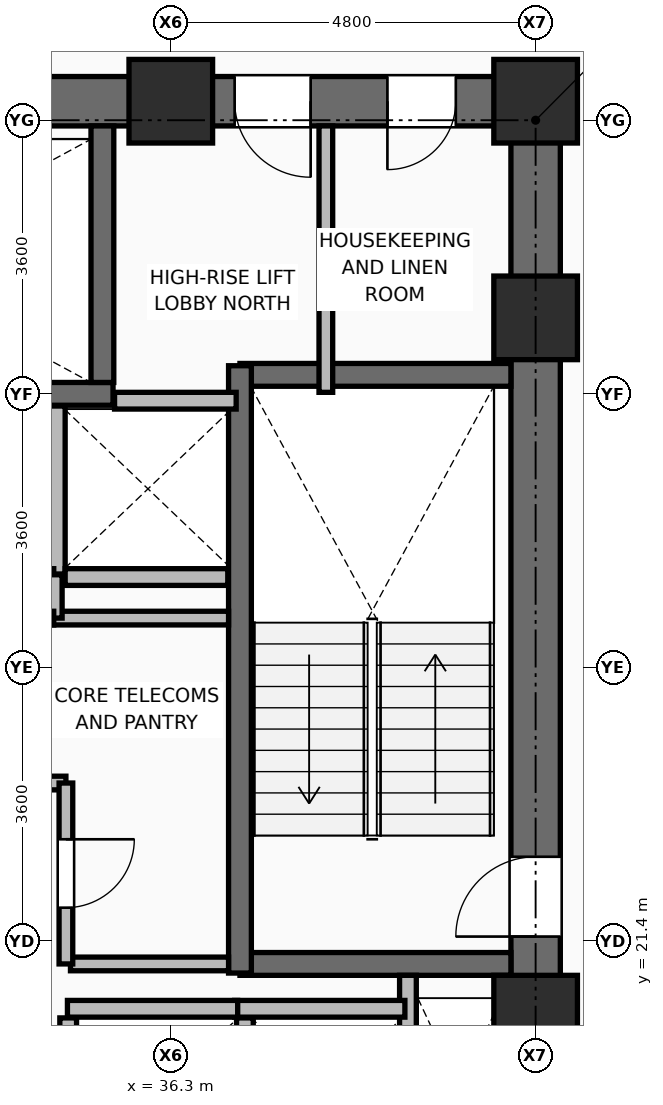
"""IFC4 building model, lengths in metres.
Left out: names, types, materials, properties, quantities, classifications, styles, units other than length and angle.
Written with IfcOpenShell. Run it as: python <this file> out.ifc"""

import sys

from ifc_helpers import new_model, si_unit, direction, frame, frame_2d, origin, origin_2d, place, context, subcontext, project, spatial, rectangle, extrude, element, fill, save


model = new_model("IFC4")
c1 = context("Model", 3, precision=1e-05, world=origin(), true_north=direction((0.0, 1.0)))
c2 = subcontext(c1, "Body", "Model", "MODEL_VIEW")
j1 = project(units=[si_unit("LENGTHUNIT", "METRE"), si_unit("PLANEANGLEUNIT", "RADIAN")], contexts=[c1])
p1 = place(None, origin())
s1 = spatial("IfcSite", under=j1, at=p1, CompositionType="ELEMENT")
p2 = place(p1, origin())
s2 = spatial("IfcBuilding", under=s1, at=p2, CompositionType="ELEMENT")
p3 = place(p2, frame((0.0, 0.0, 79.5)))
s3 = spatial("IfcBuildingStorey", under=s2, at=p3, CompositionType="ELEMENT", Elevation=79.5)
for number, where, z_axis, x_axis in (
    (1, (41.1, 20.4, 0.0), (0.0, 0.0, 1.0), (1.0, 0.0, 0.0)),
    (2, (41.1, 29.6, 0.0), (0.0, 0.0, 1.0), (1.0, 0.0, 0.0)),
    (3, (36.3, 32.45, 0.0), (0.0, 0.0, 1.0), (1.0, 0.0, 0.0)),
    (4, (41.1, 32.45, 0.0), (0.0, 0.0, 1.0), (1.0, 0.0, 0.0)),
):
    element("IfcColumn", number, at=place(p3, frame(where, z_axis=z_axis, x_axis=x_axis)), inside=s3, PredefinedType="COLUMN", context=c2, shape_type="SweptSolid", body=[
        extrude(rectangle(XDim=1.1, YDim=1.1, at=origin_2d()), origin(), (0.0, 0.0, 1.0), 3.75),
    ])
p4 = place(p3, frame((34.95, 17.92, 0.0), z_axis=(0.0, 0.0, 1.0), x_axis=(0.0, 1.0, 0.0)))
e5 = element("IfcWall", 5, at=p4, inside=s3, PredefinedType="PARTITIONING", context=c2, shape_type="SweptSolid", body=[
    extrude(rectangle(XDim=2.47, YDim=0.22, at=frame_2d((1.235, 0.0))), origin(), (0.0, 0.0, 1.0), 2.928),
])
p5 = place(p3, frame((37.275, 18.08, 0.0), z_axis=(0.0, 0.0, 1.0), x_axis=(0.0, 1.0, 0.0)))
e6 = element("IfcWall", 6, at=p5, inside=s3, PredefinedType="PARTITIONING", context=c2, shape_type="SweptSolid", body=[
    extrude(rectangle(XDim=2.31, YDim=0.22, at=frame_2d((1.155, 0.0))), origin(), (0.0, 0.0, 1.0), 3.545),
])
p6 = place(p3, frame((34.8, 26.23, 0.0), z_axis=(0.0, 0.0, 1.0), x_axis=(0.0, 1.0, 0.0)))
e7 = element("IfcWall", 7, at=p6, inside=s3, PredefinedType="PARTITIONING", context=c2, shape_type="SweptSolid", body=[
    extrude(rectangle(XDim=2.21, YDim=0.22, at=frame_2d((1.105, 0.0))), origin(), (0.0, 0.0, 1.0), 3.545),
])
p7 = place(p3, frame((34.91, 26.19, 0.0), z_axis=(0.0, 0.0, 1.0), x_axis=(1.0, 0.0, 0.0)))
e8 = element("IfcWall", 8, at=p7, inside=s3, PredefinedType="PARTITIONING", context=c2, shape_type="SweptSolid", body=[
    extrude(rectangle(XDim=2.14, YDim=0.22, at=frame_2d((1.07, 0.0))), origin(), (0.0, 0.0, 1.0), 3.545),
])
p8 = place(p3, frame((21.575, 32.45, 0.0), z_axis=(0.0, 0.0, 1.0), x_axis=(1.0, 0.0, 0.0)))
e9 = element("IfcWall", 9, at=p8, inside=s3, PredefinedType="SHEAR", context=c2, shape_type="SweptSolid", body=[
    extrude(rectangle(XDim=19.85, YDim=0.65, at=frame_2d((9.925, 0.0))), origin(), (0.0, 0.0, 1.0), 3.57),
])
p9 = place(p8, frame((2.175, 0.0, 0.0)))
e10 = element("IfcOpeningElement", 10, at=p9, cuts=e9, PredefinedType="OPENING", context=c2, shape_type="SweptSolid", body=[
    extrude(rectangle(XDim=1.1, YDim=2.1, at=frame_2d((0.55, 1.05))), frame((0.0, 0.335, 0.0), z_axis=(0.0, -1.0, 0.0), x_axis=(1.0, 0.0, 0.0)), (0.0, 0.0, 1.0), 0.67),
])
p10 = place(p8, frame((15.565, 0.0, 0.0)))
e11 = element("IfcOpeningElement", 11, at=p10, cuts=e9, PredefinedType="OPENING", context=c2, shape_type="SweptSolid", body=[
    extrude(rectangle(XDim=1.0, YDim=2.1, at=frame_2d((0.5, 1.05))), frame((0.0, 0.335, 0.0), z_axis=(0.0, -1.0, 0.0), x_axis=(1.0, 0.0, 0.0)), (0.0, 0.0, 1.0), 0.67),
])
p11 = place(p8, frame((17.575, 0.0, 0.0)))
e12 = element("IfcOpeningElement", 12, at=p11, cuts=e9, PredefinedType="OPENING", context=c2, shape_type="SweptSolid", body=[
    extrude(rectangle(XDim=0.9, YDim=2.1, at=frame_2d((0.45, 1.05))), frame((0.0, 0.335, 0.0), z_axis=(0.0, -1.0, 0.0), x_axis=(1.0, 0.0, 0.0)), (0.0, 0.0, 1.0), 0.67),
])
p12 = place(p3, frame((41.1, 18.125, 0.0), z_axis=(0.0, 0.0, 1.0), x_axis=(0.0, 1.0, 0.0)))
e13 = element("IfcWall", 13, at=p12, inside=s3, PredefinedType="SHEAR", context=c2, shape_type="SweptSolid", body=[
    extrude(rectangle(XDim=14.0, YDim=0.65, at=frame_2d((7.0, 0.0))), origin(), (0.0, 0.0, 1.0), 3.57),
])
p13 = place(p12, frame((3.335, 0.0, 0.0)))
e14 = element("IfcOpeningElement", 14, at=p13, cuts=e13, PredefinedType="OPENING", context=c2, shape_type="SweptSolid", body=[
    extrude(rectangle(XDim=1.05, YDim=2.1, at=frame_2d((0.525, 1.05))), frame((0.0, 0.335, 0.0), z_axis=(0.0, -1.0, 0.0), x_axis=(1.0, 0.0, 0.0)), (0.0, 0.0, 1.0), 0.67),
])
for number, where, z_axis, x_axis in (
    (15, (37.21, 21.1, 0.0), (0.0, 0.0, 1.0), (1.0, 0.0, 0.0)),
    (16, (37.21, 28.85, 0.0), (0.0, 0.0, 1.0), (1.0, 0.0, 0.0)),
):
    element("IfcWall", number, at=place(p3, frame(where, z_axis=z_axis, x_axis=x_axis)), inside=s3, PredefinedType="SHEAR", context=c2, shape_type="SweptSolid", body=[
        extrude(rectangle(XDim=3.565, YDim=0.3, at=frame_2d((1.782, 0.0))), origin(), (0.0, 0.0, 1.0), 3.57),
    ])
p14 = place(p3, frame((37.21, 20.98, 0.0), z_axis=(0.0, 0.0, 1.0), x_axis=(0.0, 1.0, 0.0)))
e17 = element("IfcWall", 17, at=p14, inside=s3, PredefinedType="SHEAR", context=c2, shape_type="SweptSolid", body=[
    extrude(rectangle(XDim=7.99, YDim=0.3, at=frame_2d((3.995, 0.0))), origin(), (0.0, 0.0, 1.0), 3.57),
])
p15 = place(p3, frame((27.51, 28.6, 0.0), z_axis=(0.0, 0.0, 1.0), x_axis=(1.0, 0.0, 0.0)))
e18 = element("IfcWall", 18, at=p15, inside=s3, PredefinedType="SHEAR", context=c2, shape_type="SweptSolid", body=[
    extrude(rectangle(XDim=8.03, YDim=0.3, at=frame_2d((4.015, 0.0))), origin(), (0.0, 0.0, 1.0), 3.57),
])
p16 = place(p3, frame((35.4, 28.75, 0.0), z_axis=(0.0, 0.0, 1.0), x_axis=(0.0, 1.0, 0.0)))
e19 = element("IfcWall", 19, at=p16, inside=s3, PredefinedType="SHEAR", context=c2, shape_type="SweptSolid", body=[
    extrude(rectangle(XDim=3.375, YDim=0.3, at=frame_2d((1.688, 0.0))), origin(), (0.0, 0.0, 1.0), 3.57),
])
p17 = place(p3, frame((39.42, 18.125, 0.0), z_axis=(0.0, 0.0, 1.0), x_axis=(0.0, 1.0, 0.0)))
e20 = element("IfcWall", 20, at=p17, inside=s3, PredefinedType="PARTITIONING", context=c2, shape_type="SweptSolid", body=[
    extrude(rectangle(XDim=2.825, YDim=0.22, at=frame_2d((1.413, 0.0))), origin(), (0.0, 0.0, 1.0), 3.55),
])
for number, where, z_axis, x_axis in (
    (21, (37.14, 20.51, 0.0), (0.0, 0.0, 1.0), (1.0, 0.0, 0.0)),
    (22, (34.94, 20.51, 0.0), (0.0, 0.0, 1.0), (1.0, 0.0, 0.0)),
):
    element("IfcWall", number, at=place(p3, frame(where, z_axis=z_axis, x_axis=x_axis)), inside=s3, PredefinedType="PARTITIONING", context=c2, shape_type="SweptSolid", body=[
        extrude(rectangle(XDim=2.24, YDim=0.22, at=frame_2d((1.12, 0.0))), origin(), (0.0, 0.0, 1.0), 3.55),
    ])
p18 = place(p3, frame((32.44, 26.19, 0.0), z_axis=(0.0, 0.0, 1.0), x_axis=(1.0, 0.0, 0.0)))
e23 = element("IfcWall", 23, at=p18, inside=s3, PredefinedType="PARTITIONING", context=c2, shape_type="SweptSolid", body=[
    extrude(rectangle(XDim=2.32, YDim=0.22, at=frame_2d((1.16, 0.0))), origin(), (0.0, 0.0, 1.0), 3.55),
])
p19 = place(p3, frame((35.56, 28.51, 0.0), z_axis=(0.0, 0.0, 1.0), x_axis=(1.0, 0.0, 0.0)))
e24 = element("IfcWall", 24, at=p19, inside=s3, PredefinedType="PARTITIONING", context=c2, shape_type="SweptSolid", body=[
    extrude(rectangle(XDim=1.6, YDim=0.22, at=frame_2d((0.8, 0.0))), origin(), (0.0, 0.0, 1.0), 3.55),
])
p20 = place(p3, frame((34.98, 21.1, 0.0), z_axis=(0.0, 0.0, 1.0), x_axis=(1.0, 0.0, 0.0)))
e25 = element("IfcWall", 25, at=p20, inside=s3, PredefinedType="PARTITIONING", context=c2, shape_type="SweptSolid", body=[
    extrude(rectangle(XDim=2.08, YDim=0.18, at=frame_2d((1.04, 0.0))), origin(), (0.0, 0.0, 1.0), 3.55),
])
p21 = place(p3, frame((34.72, 25.65, 0.0), z_axis=(0.0, 0.0, 1.0), x_axis=(1.0, 0.0, 0.0)))
e26 = element("IfcWall", 26, at=p21, inside=s3, PredefinedType="PARTITIONING", context=c2, shape_type="SweptSolid", body=[
    extrude(rectangle(XDim=2.34, YDim=0.18, at=frame_2d((1.17, 0.0))), origin(), (0.0, 0.0, 1.0), 3.55),
])
p22 = place(p3, frame((34.76, 25.65, 0.0), z_axis=(0.0, 0.0, 1.0), x_axis=(0.0, 1.0, 0.0)))
e27 = element("IfcWall", 27, at=p22, inside=s3, PredefinedType="PARTITIONING", context=c2, shape_type="SweptSolid", body=[
    extrude(rectangle(XDim=0.57, YDim=0.22, at=frame_2d((0.285, 0.0))), origin(), (0.0, 0.0, 1.0), 3.55),
])
p23 = place(p3, frame((33.08, 25.65, 0.0), z_axis=(0.0, 0.0, 1.0), x_axis=(1.0, 0.0, 0.0)))
e28 = element("IfcWall", 28, at=p23, inside=s3, PredefinedType="PARTITIONING", context=c2, shape_type="SweptSolid", body=[
    extrude(rectangle(XDim=1.68, YDim=0.18, at=frame_2d((0.84, 0.0))), origin(), (0.0, 0.0, 1.0), 3.55),
])
p24 = place(p3, frame((33.08, 23.48, 0.0), z_axis=(0.0, 0.0, 1.0), x_axis=(1.0, 0.0, 0.0)))
e29 = element("IfcWall", 29, at=p24, inside=s3, PredefinedType="PARTITIONING", context=c2, shape_type="SweptSolid", body=[
    extrude(rectangle(XDim=1.84, YDim=0.18, at=frame_2d((0.92, 0.0))), origin(), (0.0, 0.0, 1.0), 3.55),
])
p25 = place(p3, frame((34.92, 21.1, 0.0), z_axis=(0.0, 0.0, 1.0), x_axis=(0.0, 1.0, 0.0)))
e30 = element("IfcWall", 30, at=p25, inside=s3, PredefinedType="PARTITIONING", context=c2, shape_type="SweptSolid", body=[
    extrude(rectangle(XDim=2.38, YDim=0.18, at=frame_2d((1.19, 0.0))), origin(), (0.0, 0.0, 1.0), 3.55),
])
p26 = place(p25, frame((0.74, 0.0, 0.0)))
e31 = element("IfcOpeningElement", 31, at=p26, cuts=e30, PredefinedType="OPENING", context=c2, shape_type="SweptSolid", body=[
    extrude(rectangle(XDim=0.9, YDim=2.1, at=frame_2d((0.45, 1.05))), frame((0.0, 0.1, 0.0), z_axis=(0.0, -1.0, 0.0), x_axis=(1.0, 0.0, 0.0)), (0.0, 0.0, 1.0), 0.2),
])
p27 = place(p3, frame((38.34, 28.62, 0.0), z_axis=(0.0, 0.0, 1.0), x_axis=(0.0, 1.0, 0.0)))
e32 = element("IfcWall", 32, at=p27, inside=s3, PredefinedType="PARTITIONING", context=c2, shape_type="SweptSolid", body=[
    extrude(rectangle(XDim=3.505, YDim=0.18, at=frame_2d((1.752, 0.0))), origin(), (0.0, 0.0, 1.0), 3.55),
])
p28 = place(p13, origin())
e33 = element("IfcDoor", 33, at=p28, inside=s3, OperationType="SINGLE_SWING_LEFT", PredefinedType="DOOR", context=c2, shape_type="SweptSolid", body=[
    extrude(rectangle(XDim=1.05, YDim=2.1, at=frame_2d((0.525, 1.05))), frame((0.0, 0.025, 0.0), z_axis=(0.0, -1.0, 0.0), x_axis=(1.0, 0.0, 0.0)), (0.0, 0.0, 1.0), 0.05),
])
fill(e14, e33)
p29 = place(p26, frame((0.9, 0.0, 0.0), z_axis=(0.0, 0.0, 1.0), x_axis=(-1.0, 0.0, 0.0)))
e34 = element("IfcDoor", 34, at=p29, inside=s3, OperationType="SINGLE_SWING_LEFT", PredefinedType="DOOR", context=c2, shape_type="SweptSolid", body=[
    extrude(rectangle(XDim=0.9, YDim=2.1, at=frame_2d((0.45, 1.05))), frame((0.0, 0.025, 0.0), z_axis=(0.0, -1.0, 0.0), x_axis=(1.0, 0.0, 0.0)), (0.0, 0.0, 1.0), 0.05),
])
fill(e31, e34)
p30 = place(p10, frame((1.0, 0.0, 0.0), z_axis=(0.0, 0.0, 1.0), x_axis=(-1.0, 0.0, 0.0)))
e35 = element("IfcDoor", 35, at=p30, inside=s3, OperationType="SINGLE_SWING_LEFT", PredefinedType="DOOR", context=c2, shape_type="SweptSolid", body=[
    extrude(rectangle(XDim=1.0, YDim=2.1, at=frame_2d((0.5, 1.05))), frame((0.0, 0.025, 0.0), z_axis=(0.0, -1.0, 0.0), x_axis=(1.0, 0.0, 0.0)), (0.0, 0.0, 1.0), 0.05),
])
fill(e11, e35)
p31 = place(p11, frame((0.9, 0.0, 0.0), z_axis=(0.0, 0.0, 1.0), x_axis=(-1.0, 0.0, 0.0)))
e36 = element("IfcDoor", 36, at=p31, inside=s3, OperationType="SINGLE_SWING_RIGHT", PredefinedType="DOOR", context=c2, shape_type="SweptSolid", body=[
    extrude(rectangle(XDim=0.9, YDim=2.1, at=frame_2d((0.45, 1.05))), frame((0.0, 0.025, 0.0), z_axis=(0.0, -1.0, 0.0), x_axis=(1.0, 0.0, 0.0)), (0.0, 0.0, 1.0), 0.05),
])
fill(e12, e36)
save(model, sys.argv[1])
